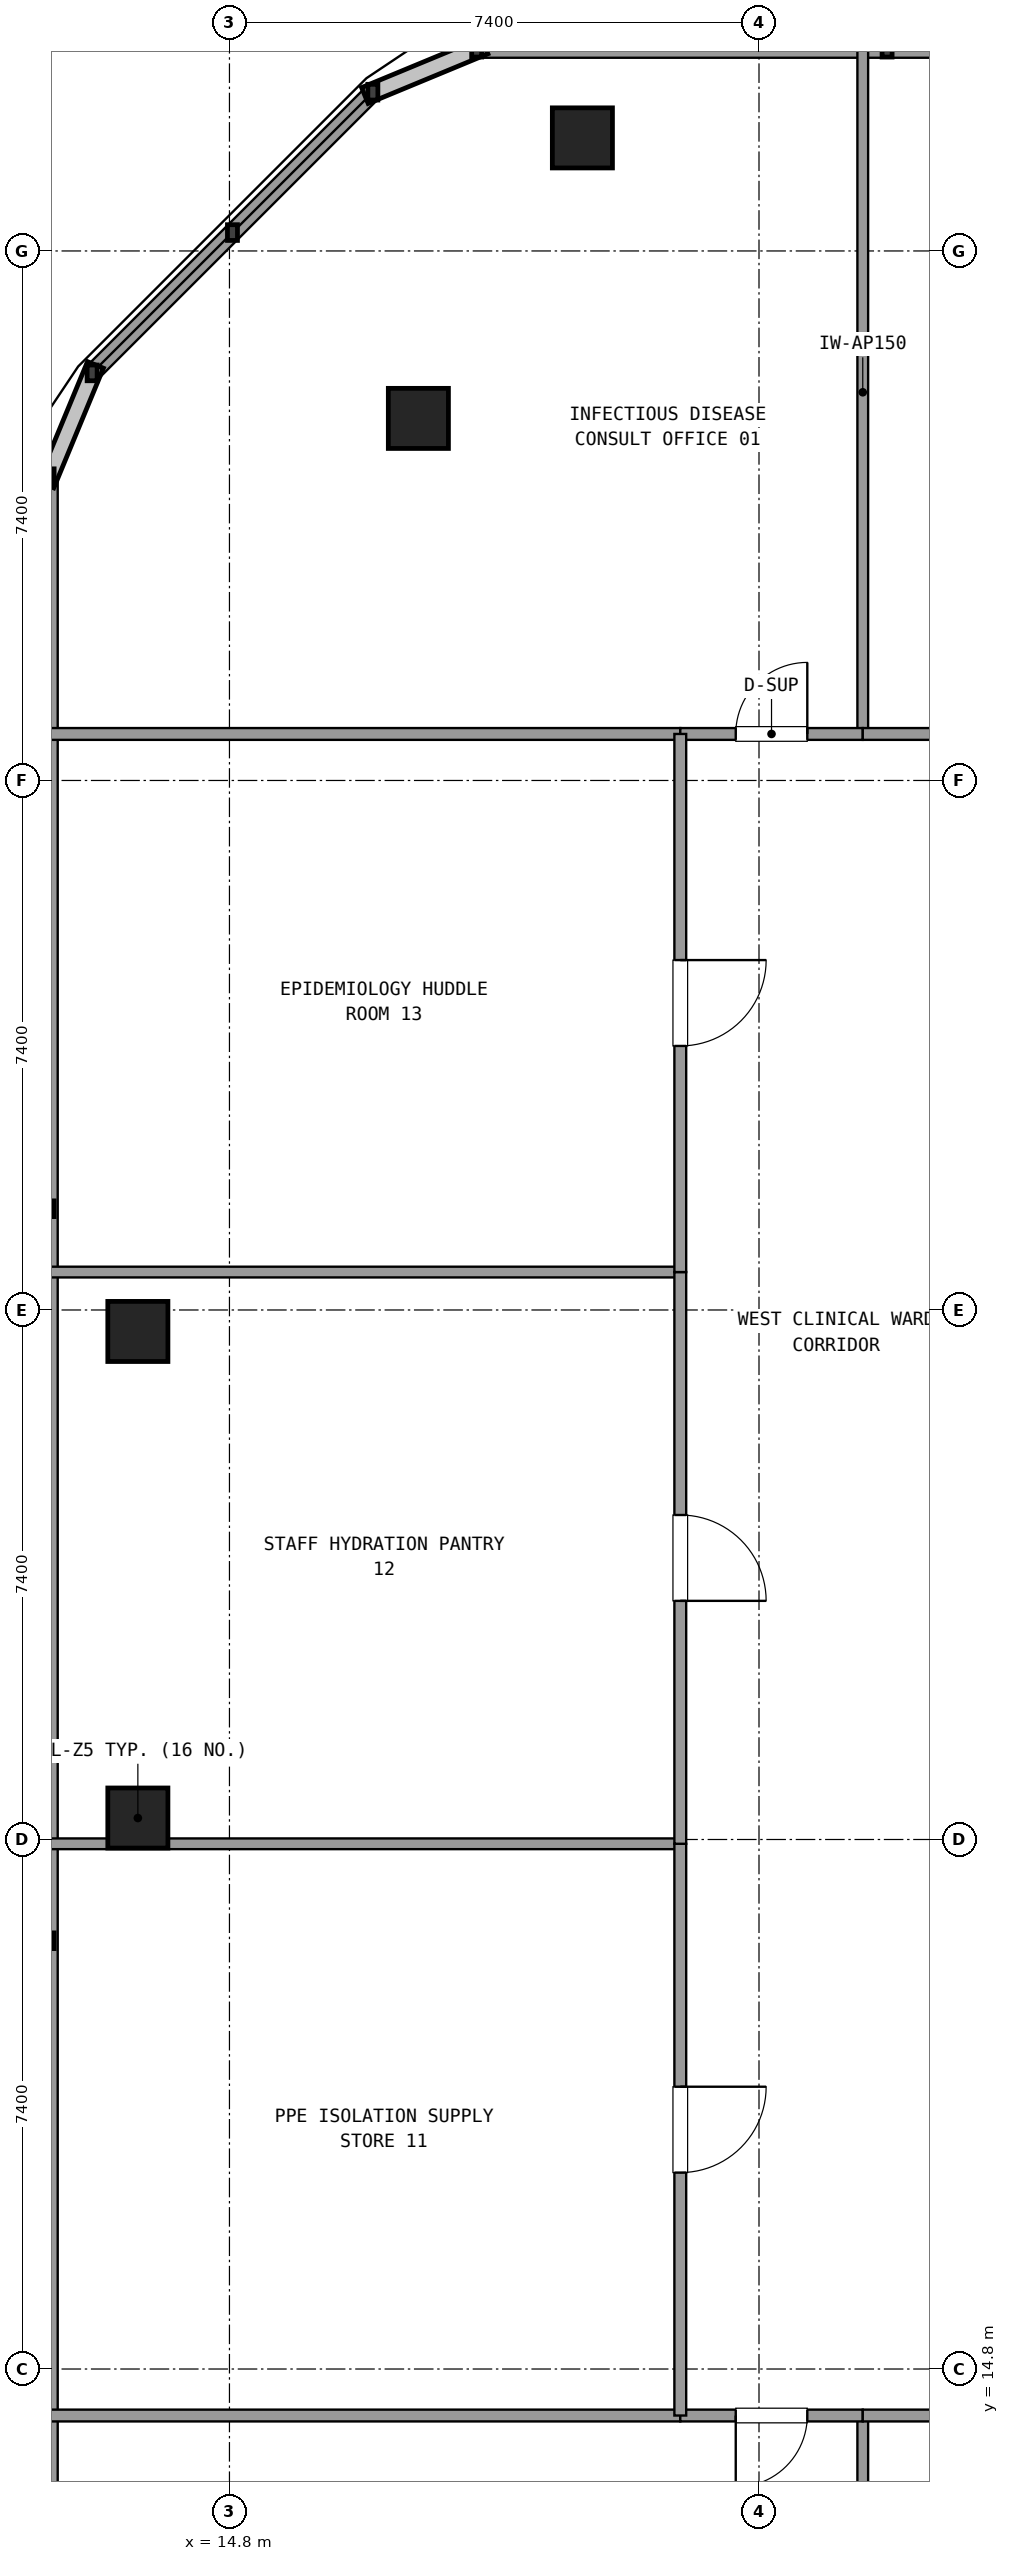
"""IFC4 building model, lengths in metres.
Left out: names, types, materials, properties, quantities, classifications, styles, units other than length and angle.
Written with IfcOpenShell. Run it as: python <this file> out.ifc"""

import sys

from ifc_helpers import new_model, si_unit, direction, frame, frame_2d, origin, origin_2d, place, context, subcontext, project, spatial, rectangle, extrude, element, fill, save


model = new_model("IFC4")
c1 = context("Model", 3, precision=1e-05, world=origin(), true_north=direction((0.0, 1.0)))
c2 = subcontext(c1, "Body", "Model", "MODEL_VIEW")
j1 = project(units=[si_unit("LENGTHUNIT", "METRE"), si_unit("PLANEANGLEUNIT", "RADIAN")], contexts=[c1])
p1 = place(None, origin())
s1 = spatial("IfcSite", under=j1, at=p1, CompositionType="ELEMENT")
p2 = place(p1, origin())
s2 = spatial("IfcBuilding", under=s1, at=p2, CompositionType="ELEMENT")
p3 = place(p2, frame((0.0, 0.0, 260.82)))
s3 = spatial("IfcBuildingStorey", under=s2, at=p3, CompositionType="ELEMENT", Elevation=260.82)
for number, where, z_axis, x_axis in (
    (1, (13.52, 22.5, 0.0), (0.0, 0.0, 1.0), (1.0, 0.0, 0.0)),
    (2, (19.732, 45.98, 0.0), (0.0, 0.0, 1.0), (1.0, 0.0, 0.0)),
    (3, (17.44, 42.06, 0.0), (0.0, 0.0, 1.0), (1.0, 0.0, 0.0)),
    (4, (13.52, 29.3, 0.0), (0.0, 0.0, 1.0), (1.0, 0.0, 0.0)),
):
    element("IfcColumn", number, at=place(p3, frame(where, z_axis=z_axis, x_axis=x_axis)), inside=s3, PredefinedType="COLUMN", context=c2, shape_type="SweptSolid", body=[
        extrude(rectangle(XDim=0.84, YDim=0.84, at=origin_2d()), origin(), (0.0, 0.0, 1.0), 3.6),
    ])
p4 = place(p3, frame((35.461, 47.22, 0.0), z_axis=(0.0, 0.0, 1.0), x_axis=(-1.0, 0.0, 0.0)))
e5 = element("IfcWall", 5, at=p4, inside=s3, PredefinedType="SOLIDWALL", context=c2, shape_type="SweptSolid", body=[
    extrude(rectangle(XDim=17.206, YDim=0.24, at=frame_2d((8.603, 0.0))), origin(), (0.0, 0.0, 1.0), 0.85),
])
p5 = place(p3, frame((16.804, 46.619, 0.0), z_axis=(0.0, 0.0, 1.0), x_axis=(-0.707106781187, -0.707106781187, 0.0)))
e6 = element("IfcWall", 6, at=p5, inside=s3, PredefinedType="SOLIDWALL", context=c2, shape_type="SweptSolid", body=[
    extrude(rectangle(XDim=5.548, YDim=0.24, at=frame_2d((2.774, 0.0))), origin(), (0.0, 0.0, 1.0), 0.85),
])
p6 = place(p3, frame((12.28, 41.245, 0.0), z_axis=(0.0, 0.0, 1.0), x_axis=(0.0, -1.0, 0.0)))
e7 = element("IfcWall", 7, at=p6, inside=s3, PredefinedType="SOLIDWALL", context=c2, shape_type="SweptSolid", body=[
    extrude(rectangle(XDim=30.69, YDim=0.24, at=frame_2d((15.345, 0.0))), origin(), (0.0, 0.0, 1.0), 0.85),
])
for number, where, z_axis, x_axis in (
    (8, (12.3, 37.65, 0.0), (0.0, 0.0, 1.0), (1.0, 0.0, 0.0)),
    (9, (12.3, 14.15, 0.0), (0.0, 0.0, 1.0), (1.0, 0.0, 0.0)),
):
    element("IfcWall", number, at=place(p3, frame(where, z_axis=z_axis, x_axis=x_axis)), inside=s3, PredefinedType="PARTITIONING", context=c2, shape_type="SweptSolid", body=[
        extrude(rectangle(XDim=8.8, YDim=0.165, at=frame_2d((4.4, 0.0))), origin(), (0.0, 0.0, 1.0), 2.61),
    ])
p7 = place(p3, frame((23.65, 37.65, 0.0), z_axis=(0.0, 0.0, 1.0), x_axis=(0.0, 1.0, 0.0)))
e10 = element("IfcWall", 10, at=p7, inside=s3, PredefinedType="PARTITIONING", context=c2, shape_type="SweptSolid", body=[
    extrude(rectangle(XDim=9.55, YDim=0.15, at=frame_2d((4.775, 0.0))), origin(), (0.0, 0.0, 1.0), 2.61),
])
p8 = place(p3, frame((21.1, 37.65, 0.0), z_axis=(0.0, 0.0, 1.0), x_axis=(1.0, 0.0, 0.0)))
e11 = element("IfcWall", 11, at=p8, inside=s3, PredefinedType="PARTITIONING", context=c2, shape_type="SweptSolid", body=[
    extrude(rectangle(XDim=2.55, YDim=0.165, at=frame_2d((1.275, 0.0))), origin(), (0.0, 0.0, 1.0), 2.61),
])
p9 = place(p8, frame((0.775, 0.0, 0.0)))
e12 = element("IfcOpeningElement", 12, at=p9, cuts=e11, PredefinedType="OPENING", context=c2, shape_type="SweptSolid", body=[
    extrude(rectangle(XDim=1.0, YDim=2.15, at=frame_2d((0.5, 1.075))), frame((0.0, 0.093, 0.0), z_axis=(0.0, -1.0, 0.0), x_axis=(1.0, 0.0, 0.0)), (0.0, 0.0, 1.0), 0.185),
])
p10 = place(p3, frame((23.65, 37.65, 0.0), z_axis=(0.0, 0.0, 1.0), x_axis=(1.0, 0.0, 0.0)))
e13 = element("IfcWall", 13, at=p10, inside=s3, PredefinedType="PARTITIONING", context=c2, shape_type="SweptSolid", body=[
    extrude(rectangle(XDim=10.508, YDim=0.165, at=frame_2d((5.254, 0.0))), origin(), (0.0, 0.0, 1.0), 2.61),
])
p11 = place(p10, frame((4.654, 0.0, 0.0)))
e14 = element("IfcOpeningElement", 14, at=p11, cuts=e13, PredefinedType="OPENING", context=c2, shape_type="SweptSolid", body=[
    extrude(rectangle(XDim=1.2, YDim=2.15, at=frame_2d((0.6, 1.075))), frame((0.0, 0.093, 0.0), z_axis=(0.0, -1.0, 0.0), x_axis=(1.0, 0.0, 0.0)), (0.0, 0.0, 1.0), 0.185),
])
p12 = place(p3, frame((23.65, 14.15, 0.0), z_axis=(0.0, 0.0, 1.0), x_axis=(0.0, -1.0, 0.0)))
e15 = element("IfcWall", 15, at=p12, inside=s3, PredefinedType="PARTITIONING", context=c2, shape_type="SweptSolid", body=[
    extrude(rectangle(XDim=9.55, YDim=0.15, at=frame_2d((4.775, 0.0))), origin(), (0.0, 0.0, 1.0), 2.61),
])
p13 = place(p3, frame((21.1, 14.15, 0.0), z_axis=(0.0, 0.0, 1.0), x_axis=(1.0, 0.0, 0.0)))
e16 = element("IfcWall", 16, at=p13, inside=s3, PredefinedType="PARTITIONING", context=c2, shape_type="SweptSolid", body=[
    extrude(rectangle(XDim=2.55, YDim=0.165, at=frame_2d((1.275, 0.0))), origin(), (0.0, 0.0, 1.0), 2.61),
])
p14 = place(p13, frame((0.775, 0.0, 0.0)))
e17 = element("IfcOpeningElement", 17, at=p14, cuts=e16, PredefinedType="OPENING", context=c2, shape_type="SweptSolid", body=[
    extrude(rectangle(XDim=1.0, YDim=2.15, at=frame_2d((0.5, 1.075))), frame((0.0, 0.093, 0.0), z_axis=(0.0, -1.0, 0.0), x_axis=(1.0, 0.0, 0.0)), (0.0, 0.0, 1.0), 0.185),
])
p15 = place(p3, frame((23.65, 14.15, 0.0), z_axis=(0.0, 0.0, 1.0), x_axis=(1.0, 0.0, 0.0)))
e18 = element("IfcWall", 18, at=p15, inside=s3, PredefinedType="PARTITIONING", context=c2, shape_type="SweptSolid", body=[
    extrude(rectangle(XDim=7.667, YDim=0.165, at=frame_2d((3.833, 0.0))), origin(), (0.0, 0.0, 1.0), 2.61),
])
p16 = place(p15, frame((3.234, 0.0, 0.0)))
e19 = element("IfcOpeningElement", 19, at=p16, cuts=e18, PredefinedType="OPENING", context=c2, shape_type="SweptSolid", body=[
    extrude(rectangle(XDim=1.2, YDim=2.15, at=frame_2d((0.6, 1.075))), frame((0.0, 0.093, 0.0), z_axis=(0.0, -1.0, 0.0), x_axis=(1.0, 0.0, 0.0)), (0.0, 0.0, 1.0), 0.185),
])
p17 = place(p3, frame((21.1, 22.14, 0.0), z_axis=(0.0, 0.0, 1.0), x_axis=(-1.0, 0.0, 0.0)))
e20 = element("IfcWall", 20, at=p17, inside=s3, PredefinedType="PARTITIONING", context=c2, shape_type="SweptSolid", body=[
    extrude(rectangle(XDim=8.8, YDim=0.15, at=frame_2d((4.4, 0.0))), origin(), (0.0, 0.0, 1.0), 2.61),
])
p18 = place(p3, frame((21.1, 14.15, 0.0), z_axis=(0.0, 0.0, 1.0), x_axis=(0.0, 1.0, 0.0)))
e21 = element("IfcWall", 21, at=p18, inside=s3, PredefinedType="PARTITIONING", context=c2, shape_type="SweptSolid", body=[
    extrude(rectangle(XDim=7.99, YDim=0.165, at=frame_2d((3.995, 0.0))), origin(), (0.0, 0.0, 1.0), 2.61),
])
p19 = place(p18, frame((3.395, 0.0, 0.0)))
e22 = element("IfcOpeningElement", 22, at=p19, cuts=e21, PredefinedType="OPENING", context=c2, shape_type="SweptSolid", body=[
    extrude(rectangle(XDim=1.2, YDim=2.15, at=frame_2d((0.6, 1.075))), frame((0.0, 0.093, 0.0), z_axis=(0.0, -1.0, 0.0), x_axis=(1.0, 0.0, 0.0)), (0.0, 0.0, 1.0), 0.185),
])
p20 = place(p3, frame((21.1, 30.13, 0.0), z_axis=(0.0, 0.0, 1.0), x_axis=(-1.0, 0.0, 0.0)))
e23 = element("IfcWall", 23, at=p20, inside=s3, PredefinedType="PARTITIONING", context=c2, shape_type="SweptSolid", body=[
    extrude(rectangle(XDim=8.8, YDim=0.15, at=frame_2d((4.4, 0.0))), origin(), (0.0, 0.0, 1.0), 2.61),
])
p21 = place(p3, frame((21.1, 22.14, 0.0), z_axis=(0.0, 0.0, 1.0), x_axis=(0.0, 1.0, 0.0)))
e24 = element("IfcWall", 24, at=p21, inside=s3, PredefinedType="PARTITIONING", context=c2, shape_type="SweptSolid", body=[
    extrude(rectangle(XDim=7.99, YDim=0.165, at=frame_2d((3.995, 0.0))), origin(), (0.0, 0.0, 1.0), 2.61),
])
p22 = place(p21, frame((3.395, 0.0, 0.0)))
e25 = element("IfcOpeningElement", 25, at=p22, cuts=e24, PredefinedType="OPENING", context=c2, shape_type="SweptSolid", body=[
    extrude(rectangle(XDim=1.2, YDim=2.15, at=frame_2d((0.6, 1.075))), frame((0.0, 0.093, 0.0), z_axis=(0.0, -1.0, 0.0), x_axis=(1.0, 0.0, 0.0)), (0.0, 0.0, 1.0), 0.185),
])
p23 = place(p3, frame((21.1, 30.13, 0.0), z_axis=(0.0, 0.0, 1.0), x_axis=(0.0, 1.0, 0.0)))
e26 = element("IfcWall", 26, at=p23, inside=s3, PredefinedType="PARTITIONING", context=c2, shape_type="SweptSolid", body=[
    extrude(rectangle(XDim=7.52, YDim=0.165, at=frame_2d((3.76, 0.0))), origin(), (0.0, 0.0, 1.0), 2.61),
])
p24 = place(p23, frame((3.16, 0.0, 0.0)))
e27 = element("IfcOpeningElement", 27, at=p24, cuts=e26, PredefinedType="OPENING", context=c2, shape_type="SweptSolid", body=[
    extrude(rectangle(XDim=1.2, YDim=2.15, at=frame_2d((0.6, 1.075))), frame((0.0, 0.093, 0.0), z_axis=(0.0, -1.0, 0.0), x_axis=(1.0, 0.0, 0.0)), (0.0, 0.0, 1.0), 0.185),
])
p25 = place(p9, origin())
e28 = element("IfcDoor", 28, at=p25, inside=s3, OperationType="SINGLE_SWING_RIGHT", PredefinedType="DOOR", context=c2, shape_type="SweptSolid", body=[
    extrude(rectangle(XDim=1.0, YDim=2.15, at=frame_2d((0.5, 1.075))), frame((0.0, 0.025, 0.0), z_axis=(0.0, -1.0, 0.0), x_axis=(1.0, 0.0, 0.0)), (0.0, 0.0, 1.0), 0.05),
])
fill(e12, e28)
p26 = place(p14, frame((1.0, 0.0, 0.0), z_axis=(0.0, 0.0, 1.0), x_axis=(-1.0, 0.0, 0.0)))
e29 = element("IfcDoor", 29, at=p26, inside=s3, OperationType="SINGLE_SWING_LEFT", PredefinedType="DOOR", context=c2, shape_type="SweptSolid", body=[
    extrude(rectangle(XDim=1.0, YDim=2.15, at=frame_2d((0.5, 1.075))), frame((0.0, 0.025, 0.0), z_axis=(0.0, -1.0, 0.0), x_axis=(1.0, 0.0, 0.0)), (0.0, 0.0, 1.0), 0.05),
])
fill(e17, e29)
p27 = place(p19, frame((1.2, 0.0, 0.0), z_axis=(0.0, 0.0, 1.0), x_axis=(-1.0, 0.0, 0.0)))
e30 = element("IfcDoor", 30, at=p27, inside=s3, OperationType="SINGLE_SWING_RIGHT", PredefinedType="DOOR", context=c2, shape_type="SweptSolid", body=[
    extrude(rectangle(XDim=1.2, YDim=2.15, at=frame_2d((0.6, 1.075))), frame((0.0, 0.025, 0.0), z_axis=(0.0, -1.0, 0.0), x_axis=(1.0, 0.0, 0.0)), (0.0, 0.0, 1.0), 0.05),
])
fill(e22, e30)
p28 = place(p22, frame((1.2, 0.0, 0.0), z_axis=(0.0, 0.0, 1.0), x_axis=(-1.0, 0.0, 0.0)))
e31 = element("IfcDoor", 31, at=p28, inside=s3, OperationType="SINGLE_SWING_LEFT", PredefinedType="DOOR", context=c2, shape_type="SweptSolid", body=[
    extrude(rectangle(XDim=1.2, YDim=2.15, at=frame_2d((0.6, 1.075))), frame((0.0, 0.025, 0.0), z_axis=(0.0, -1.0, 0.0), x_axis=(1.0, 0.0, 0.0)), (0.0, 0.0, 1.0), 0.05),
])
fill(e25, e31)
p29 = place(p24, frame((1.2, 0.0, 0.0), z_axis=(0.0, 0.0, 1.0), x_axis=(-1.0, 0.0, 0.0)))
e32 = element("IfcDoor", 32, at=p29, inside=s3, OperationType="SINGLE_SWING_RIGHT", PredefinedType="DOOR", context=c2, shape_type="SweptSolid", body=[
    extrude(rectangle(XDim=1.2, YDim=2.15, at=frame_2d((0.6, 1.075))), frame((0.0, 0.025, 0.0), z_axis=(0.0, -1.0, 0.0), x_axis=(1.0, 0.0, 0.0)), (0.0, 0.0, 1.0), 0.05),
])
fill(e27, e32)
save(model, sys.argv[1])
